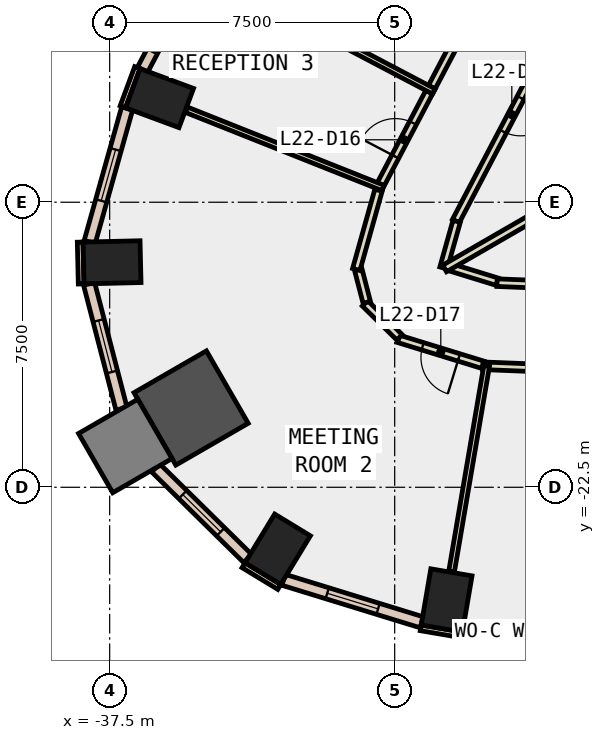
"""IFC4 building model, lengths in metres.
Left out: names, types, materials, properties, quantities, classifications, styles, units other than length and angle.
Written with IfcOpenShell. Run it as: python <this file> out.ifc"""

import sys

from ifc_helpers import new_model, si_unit, direction, frame, frame_2d, origin, origin_2d, place, context, subcontext, project, spatial, rectangle, extrude, element, fill, save


model = new_model("IFC4")
c1 = context("Model", 3, precision=1e-05, world=origin(), true_north=direction((0.0, 1.0)))
c2 = subcontext(c1, "Body", "Model", "MODEL_VIEW")
j1 = project(units=[si_unit("LENGTHUNIT", "METRE"), si_unit("PLANEANGLEUNIT", "RADIAN")], contexts=[c1])
p1 = place(None, origin())
s1 = spatial("IfcSite", under=j1, at=p1, CompositionType="ELEMENT")
p2 = place(p1, origin())
s2 = spatial("IfcBuilding", under=s1, at=p2, CompositionType="ELEMENT")
p3 = place(p2, frame((0.0, 0.0, 103.4)))
s3 = spatial("IfcBuildingStorey", under=s2, at=p3, CompositionType="ELEMENT", Elevation=103.4)
for number, where, z_axis, x_axis in (
    (1, (-28.633, -25.478, -0.4), (0.0, 0.0, 1.0), (-0.986, 0.168, 0.0)),
    (2, (-36.188, -12.261, -0.4), (0.0, 0.0, 1.0), (0.347, 0.938, 0.0)),
    (3, (-37.438, -16.581, -0.4), (0.0, 0.0, 1.0), (-0.023, 1.0, 0.0)),
):
    element("IfcColumn", number, at=place(p3, frame(where, z_axis=z_axis, x_axis=x_axis)), inside=s3, PredefinedType="COLUMN", context=c2, shape_type="SweptSolid", body=[
        extrude(rectangle(XDim=1.1, YDim=1.5, at=origin_2d()), origin(), (0.0, 0.0, 1.0), 4.2),
    ])
p4 = place(p3, frame((-35.357, -20.414, -0.4), z_axis=(0.0, 0.0, 1.0), x_axis=(0.866025403784, 0.5, 0.0)))
e4 = element("IfcColumn", 4, at=p4, inside=s3, PredefinedType="COLUMN", context=c2, shape_type="SweptSolid", body=[
    extrude(rectangle(XDim=2.2, YDim=2.2, at=origin_2d()), origin(), (0.0, 0.0, 1.0), 4.2),
])
p5 = place(p3, frame((-33.078, -24.132, -0.4), z_axis=(0.0, 0.0, 1.0), x_axis=(-0.854095929175, 0.520115510024, 0.0)))
e5 = element("IfcColumn", 5, at=p5, inside=s3, PredefinedType="COLUMN", context=c2, shape_type="SweptSolid", body=[
    extrude(rectangle(XDim=1.1, YDim=1.5, at=origin_2d()), origin(), (0.0, 0.0, 1.0), 4.2),
])
p6 = place(p3, frame((-37.089, -21.414, -0.4), z_axis=(0.0, 0.0, 1.0), x_axis=(0.866025403784, 0.5, 0.0)))
e6 = element("IfcColumn", 6, at=p6, inside=s3, PredefinedType="COLUMN", context=c2, shape_type="SweptSolid", body=[
    extrude(rectangle(XDim=1.8, YDim=1.8, at=origin_2d()), origin(), (0.0, 0.0, 1.0), 4.2),
])
p7 = place(p3, frame((-36.771, -11.458, 0.0), z_axis=(0.0, 0.0, 1.0), x_axis=(-0.347205967468, -0.937788897436, 0.0)))
e7 = element("IfcWall", 7, at=p7, inside=s3, PredefinedType="STANDARD", context=c2, shape_type="SweptSolid", body=[
    extrude(rectangle(XDim=1.1, YDim=0.15, at=frame_2d((0.55, 0.0))), origin(), (0.0, 0.0, 1.0), 3.8),
])
p8 = place(p3, frame((-29.314, -26.199, 0.0), z_axis=(0.0, 0.0, 1.0), x_axis=(0.985763338892, -0.168138751323, 0.0)))
e8 = element("IfcWall", 8, at=p8, inside=s3, PredefinedType="STANDARD", context=c2, shape_type="SweptSolid", body=[
    extrude(rectangle(XDim=1.101, YDim=0.15, at=frame_2d((0.55, 0.0))), origin(), (0.0, 0.0, 1.0), 3.8),
])
p9 = place(p3, frame((-38.276, -16.05, 0.0), z_axis=(0.0, 0.0, 1.0), x_axis=(0.023522901136, -0.999723298279, 0.0)))
e9 = element("IfcWall", 9, at=p9, inside=s3, PredefinedType="STANDARD", context=c2, shape_type="SweptSolid", body=[
    extrude(rectangle(XDim=1.1, YDim=0.15, at=frame_2d((0.55, 0.0))), origin(), (0.0, 0.0, 1.0), 3.8),
])
p10 = place(p3, frame((-33.977, -24.551, 0.0), z_axis=(0.0, 0.0, 1.0), x_axis=(0.854245682901, -0.519869515594, 0.0)))
e10 = element("IfcWall", 10, at=p10, inside=s3, PredefinedType="STANDARD", context=c2, shape_type="SweptSolid", body=[
    extrude(rectangle(XDim=1.1, YDim=0.15, at=frame_2d((0.55, 0.0))), origin(), (0.0, 0.0, 1.0), 3.8),
])
p11 = place(p3, frame((-28.205, -26.238, 0.0), z_axis=(0.0, 0.0, 1.0), x_axis=(0.99922113396, -0.039460428885, 0.0)))
e11 = element("IfcWall", 11, at=p11, inside=s3, PredefinedType="STANDARD", context=c2, shape_type="SweptSolid", body=[
    extrude(rectangle(XDim=5.878, YDim=0.3, at=frame_2d((2.939, 0.0))), origin(), (0.0, 0.0, 1.0), 3.8),
])
p12 = place(p11, frame((0.469, 0.0, 0.9)))
e12 = element("IfcOpeningElement", 12, at=p12, cuts=e11, PredefinedType="OPENING", context=c2, shape_type="SweptSolid", body=[
    extrude(rectangle(XDim=2.0, YDim=2.6, at=frame_2d((1.0, 1.3))), frame((0.0, 0.16, 0.0), z_axis=(0.0, -1.0, 0.0), x_axis=(1.0, 0.0, 0.0)), (0.0, 0.0, 1.0), 0.32),
])
p13 = place(p11, frame((3.408, 0.0, 0.9)))
e13 = element("IfcOpeningElement", 13, at=p13, cuts=e11, PredefinedType="OPENING", context=c2, shape_type="SweptSolid", body=[
    extrude(rectangle(XDim=2.0, YDim=2.6, at=frame_2d((1.0, 1.3))), frame((0.0, 0.16, 0.0), z_axis=(0.0, -1.0, 0.0), x_axis=(1.0, 0.0, 0.0)), (0.0, 0.0, 1.0), 0.32),
])
p14 = place(p3, frame((-33.776, -6.077, 0.0), z_axis=(0.0, 0.0, 1.0), x_axis=(-0.465380908665, -0.88511050714, 0.0)))
e14 = element("IfcWall", 14, at=p14, inside=s3, PredefinedType="STANDARD", context=c2, shape_type="SweptSolid", body=[
    extrude(rectangle(XDim=6.139, YDim=0.3, at=frame_2d((3.07, 0.0))), origin(), (0.0, 0.0, 1.0), 3.8),
])
p15 = place(p14, frame((0.535, 0.0, 0.9)))
e15 = element("IfcOpeningElement", 15, at=p15, cuts=e14, PredefinedType="OPENING", context=c2, shape_type="SweptSolid", body=[
    extrude(rectangle(XDim=2.0, YDim=2.6, at=frame_2d((1.0, 1.3))), frame((0.0, 0.16, 0.0), z_axis=(0.0, -1.0, 0.0), x_axis=(1.0, 0.0, 0.0)), (0.0, 0.0, 1.0), 0.32),
])
p16 = place(p14, frame((3.604, 0.0, 0.9)))
e16 = element("IfcOpeningElement", 16, at=p16, cuts=e14, PredefinedType="OPENING", context=c2, shape_type="SweptSolid", body=[
    extrude(rectangle(XDim=2.0, YDim=2.6, at=frame_2d((1.0, 1.3))), frame((0.0, 0.16, 0.0), z_axis=(0.0, -1.0, 0.0), x_axis=(1.0, 0.0, 0.0)), (0.0, 0.0, 1.0), 0.32),
])
p17 = place(p3, frame((-37.04, -12.531, 0.0), z_axis=(0.0, 0.0, 1.0), x_axis=(-0.270054089595, -0.96284515302, 0.0)))
e17 = element("IfcWall", 17, at=p17, inside=s3, PredefinedType="STANDARD", context=c2, shape_type="SweptSolid", body=[
    extrude(rectangle(XDim=3.651, YDim=0.3, at=frame_2d((1.825, 0.0))), origin(), (0.0, 0.0, 1.0), 3.8),
])
p18 = place(p17, frame((1.125, 0.0, 0.9)))
e18 = element("IfcOpeningElement", 18, at=p18, cuts=e17, PredefinedType="OPENING", context=c2, shape_type="SweptSolid", body=[
    extrude(rectangle(XDim=1.4, YDim=2.6, at=frame_2d((0.7, 1.3))), frame((0.0, 0.16, 0.0), z_axis=(0.0, -1.0, 0.0), x_axis=(1.0, 0.0, 0.0)), (0.0, 0.0, 1.0), 0.32),
])
p19 = place(p3, frame((-38.042, -17.144, 0.0), z_axis=(0.0, 0.0, 1.0), x_axis=(0.251046938153, -0.967974914367, 0.0)))
e19 = element("IfcWall", 19, at=p19, inside=s3, PredefinedType="STANDARD", context=c2, shape_type="SweptSolid", body=[
    extrude(rectangle(XDim=3.398, YDim=0.3, at=frame_2d((1.699, 0.0))), origin(), (0.0, 0.0, 1.0), 3.8),
])
p20 = place(p19, frame((0.999, 0.0, 0.9)))
e20 = element("IfcOpeningElement", 20, at=p20, cuts=e19, PredefinedType="OPENING", context=c2, shape_type="SweptSolid", body=[
    extrude(rectangle(XDim=1.4, YDim=2.6, at=frame_2d((0.7, 1.3))), frame((0.0, 0.16, 0.0), z_axis=(0.0, -1.0, 0.0), x_axis=(1.0, 0.0, 0.0)), (0.0, 0.0, 1.0), 0.32),
])
p21 = place(p3, frame((-36.289, -21.99, 0.0), z_axis=(0.0, 0.0, 1.0), x_axis=(0.712546371703, -0.701625019631, 0.0)))
e21 = element("IfcWall", 21, at=p21, inside=s3, PredefinedType="STANDARD", context=c2, shape_type="SweptSolid", body=[
    extrude(rectangle(XDim=3.398, YDim=0.3, at=frame_2d((1.699, 0.0))), origin(), (0.0, 0.0, 1.0), 3.8),
])
p22 = place(p21, frame((0.999, 0.0, 0.9)))
e22 = element("IfcOpeningElement", 22, at=p22, cuts=e21, PredefinedType="OPENING", context=c2, shape_type="SweptSolid", body=[
    extrude(rectangle(XDim=1.4, YDim=2.6, at=frame_2d((0.7, 1.3))), frame((0.0, 0.16, 0.0), z_axis=(0.0, -1.0, 0.0), x_axis=(1.0, 0.0, 0.0)), (0.0, 0.0, 1.0), 0.32),
])
p23 = place(p3, frame((-32.924, -24.935, 0.0), z_axis=(0.0, 0.0, 1.0), x_axis=(0.955841433148, -0.293882892794, 0.0)))
e23 = element("IfcWall", 23, at=p23, inside=s3, PredefinedType="STANDARD", context=c2, shape_type="SweptSolid", body=[
    extrude(rectangle(XDim=3.804, YDim=0.3, at=frame_2d((1.902, 0.0))), origin(), (0.0, 0.0, 1.0), 3.8),
])
p24 = place(p23, frame((1.202, 0.0, 0.9)))
e24 = element("IfcOpeningElement", 24, at=p24, cuts=e23, PredefinedType="OPENING", context=c2, shape_type="SweptSolid", body=[
    extrude(rectangle(XDim=1.4, YDim=2.6, at=frame_2d((0.7, 1.3))), frame((0.0, 0.16, 0.0), z_axis=(0.0, -1.0, 0.0), x_axis=(1.0, 0.0, 0.0)), (0.0, 0.0, 1.0), 0.32),
])
p25 = place(p3, frame((-25.446, -9.896, 0.0), z_axis=(0.0, 0.0, 1.0), x_axis=(-0.465367816287, -0.885117390838, 0.0)))
e25 = element("IfcWall", 25, at=p25, inside=s3, PredefinedType="PARTITIONING", context=c2, shape_type="SweptSolid", body=[
    extrude(rectangle(XDim=6.326, YDim=0.2, at=frame_2d((3.163, 0.0))), origin(), (0.0, 0.0, 1.0), 3.8),
])
p26 = place(p25, frame((2.663, 0.0, 0.0)))
e26 = element("IfcOpeningElement", 26, at=p26, cuts=e25, PredefinedType="OPENING", context=c2, shape_type="SweptSolid", body=[
    extrude(rectangle(XDim=1.0, YDim=2.1, at=frame_2d((0.5, 1.05))), frame((0.0, 0.11, 0.0), z_axis=(0.0, -1.0, 0.0), x_axis=(1.0, 0.0, 0.0)), (0.0, 0.0, 1.0), 0.22),
])
p27 = place(p3, frame((-28.37, -15.503, 0.0), z_axis=(0.0, 0.0, 1.0), x_axis=(-0.270645732093, -0.962679015924, 0.0)))
e27 = element("IfcWall", 27, at=p27, inside=s3, PredefinedType="PARTITIONING", context=c2, shape_type="SweptSolid", body=[
    extrude(rectangle(XDim=1.275, YDim=0.2, at=frame_2d((0.637, 0.0))), origin(), (0.0, 0.0, 1.0), 3.8),
])
p28 = place(p3, frame((-28.503, -16.722, 0.0), z_axis=(0.0, 0.0, 1.0), x_axis=(0.95579582576, -0.294031187904, 0.0)))
e28 = element("IfcWall", 28, at=p28, inside=s3, PredefinedType="PARTITIONING", context=c2, shape_type="SweptSolid", body=[
    extrude(rectangle(XDim=1.255, YDim=0.2, at=frame_2d((0.628, 0.0))), origin(), (0.0, 0.0, 1.0), 3.8),
])
p29 = place(p3, frame((-27.307, -17.116, 0.0), z_axis=(0.0, 0.0, 1.0), x_axis=(0.999217829656, -0.039544012168, 0.0)))
e29 = element("IfcWall", 29, at=p29, inside=s3, PredefinedType="PARTITIONING", context=c2, shape_type="SweptSolid", body=[
    extrude(rectangle(XDim=5.841, YDim=0.2, at=frame_2d((2.92, 0.0))), origin(), (0.0, 0.0, 1.0), 3.8),
])
p30 = place(p29, frame((2.42, 0.0, 0.0)))
e30 = element("IfcOpeningElement", 30, at=p30, cuts=e29, PredefinedType="OPENING", context=c2, shape_type="SweptSolid", body=[
    extrude(rectangle(XDim=1.0, YDim=2.1, at=frame_2d((0.5, 1.05))), frame((0.0, 0.11, 0.0), z_axis=(0.0, -1.0, 0.0), x_axis=(1.0, 0.0, 0.0)), (0.0, 0.0, 1.0), 0.22),
])
p31 = place(p3, frame((-29.023, -11.972, 0.0), z_axis=(0.0, 0.0, 1.0), x_axis=(0.465457263931, 0.885070356217, 0.0)))
e31 = element("IfcWall", 31, at=p31, inside=s3, PredefinedType="PARTITIONING", context=c2, shape_type="SweptSolid", body=[
    extrude(rectangle(XDim=3.515, YDim=0.2, at=frame_2d((1.757, 0.0))), origin(), (0.0, 0.0, 1.0), 3.8),
])
p32 = place(p31, frame((1.257, 0.0, 0.0)))
e32 = element("IfcOpeningElement", 32, at=p32, cuts=e31, PredefinedType="OPENING", context=c2, shape_type="SweptSolid", body=[
    extrude(rectangle(XDim=1.0, YDim=2.1, at=frame_2d((0.5, 1.05))), frame((0.0, 0.11, 0.0), z_axis=(0.0, -1.0, 0.0), x_axis=(1.0, 0.0, 0.0)), (0.0, 0.0, 1.0), 0.22),
])
p33 = place(p3, frame((-30.41, -14.61, 0.0), z_axis=(0.0, 0.0, 1.0), x_axis=(0.46516343569, 0.885224817827, 0.0)))
e33 = element("IfcWall", 33, at=p33, inside=s3, PredefinedType="PARTITIONING", context=c2, shape_type="SweptSolid", body=[
    extrude(rectangle(XDim=2.831, YDim=0.2, at=frame_2d((1.416, 0.0))), origin(), (0.0, 0.0, 1.0), 3.8),
])
p34 = place(p33, frame((0.916, 0.0, 0.0)))
e34 = element("IfcOpeningElement", 34, at=p34, cuts=e33, PredefinedType="OPENING", context=c2, shape_type="SweptSolid", body=[
    extrude(rectangle(XDim=1.0, YDim=2.1, at=frame_2d((0.5, 1.05))), frame((0.0, 0.11, 0.0), z_axis=(0.0, -1.0, 0.0), x_axis=(1.0, 0.0, 0.0)), (0.0, 0.0, 1.0), 0.22),
])
p35 = place(p3, frame((-27.676, -19.278, 0.0), z_axis=(0.0, 0.0, 1.0), x_axis=(-0.95581080774, 0.293982482143, 0.0)))
e35 = element("IfcWall", 35, at=p35, inside=s3, PredefinedType="PARTITIONING", context=c2, shape_type="SweptSolid", body=[
    extrude(rectangle(XDim=2.324, YDim=0.2, at=frame_2d((1.162, 0.0))), origin(), (0.0, 0.0, 1.0), 3.8),
])
p36 = place(p35, frame((0.662, 0.0, 0.0)))
e36 = element("IfcOpeningElement", 36, at=p36, cuts=e35, PredefinedType="OPENING", context=c2, shape_type="SweptSolid", body=[
    extrude(rectangle(XDim=1.0, YDim=2.1, at=frame_2d((0.5, 1.05))), frame((0.0, 0.11, 0.0), z_axis=(0.0, -1.0, 0.0), x_axis=(1.0, 0.0, 0.0)), (0.0, 0.0, 1.0), 0.22),
])
p37 = place(p3, frame((-29.873, -18.554, 0.0), z_axis=(0.0, 0.0, 1.0), x_axis=(-0.712546188185, 0.701625206006, 0.0)))
e37 = element("IfcWall", 37, at=p37, inside=s3, PredefinedType="PARTITIONING", context=c2, shape_type="SweptSolid", body=[
    extrude(rectangle(XDim=1.274, YDim=0.2, at=frame_2d((0.637, 0.0))), origin(), (0.0, 0.0, 1.0), 3.8),
])
p38 = place(p3, frame((-30.735, -17.634, 0.0), z_axis=(0.0, 0.0, 1.0), x_axis=(-0.251095196118, 0.967962397248, 0.0)))
e38 = element("IfcWall", 38, at=p38, inside=s3, PredefinedType="PARTITIONING", context=c2, shape_type="SweptSolid", body=[
    extrude(rectangle(XDim=0.892, YDim=0.2, at=frame_2d((0.446, 0.0))), origin(), (0.0, 0.0, 1.0), 3.8),
])
p39 = place(p3, frame((-31.011, -16.77, 0.0), z_axis=(0.0, 0.0, 1.0), x_axis=(0.270131711391, 0.962823378664, 0.0)))
e39 = element("IfcWall", 39, at=p39, inside=s3, PredefinedType="PARTITIONING", context=c2, shape_type="SweptSolid", body=[
    extrude(rectangle(XDim=2.166, YDim=0.2, at=frame_2d((1.083, 0.0))), origin(), (0.0, 0.0, 1.0), 3.8),
])
p40 = place(p3, frame((-21.547, -19.546, 0.0), z_axis=(0.0, 0.0, 1.0), x_axis=(-0.999216450883, 0.039578836331, 0.0)))
e40 = element("IfcWall", 40, at=p40, inside=s3, PredefinedType="PARTITIONING", context=c2, shape_type="SweptSolid", body=[
    extrude(rectangle(XDim=6.138, YDim=0.2, at=frame_2d((3.069, 0.0))), origin(), (0.0, 0.0, 1.0), 3.8),
])
p41 = place(p40, frame((2.569, 0.0, 0.0)))
e41 = element("IfcOpeningElement", 41, at=p41, cuts=e40, PredefinedType="OPENING", context=c2, shape_type="SweptSolid", body=[
    extrude(rectangle(XDim=1.0, YDim=2.1, at=frame_2d((0.5, 1.05))), frame((0.0, 0.11, 0.0), z_axis=(0.0, -1.0, 0.0), x_axis=(1.0, 0.0, 0.0)), (0.0, 0.0, 1.0), 0.22),
])
p42 = place(p3, frame((-19.277, -11.311, 0.0), z_axis=(0.0, 0.0, 1.0), x_axis=(-0.866078939042, -0.499907262747, 0.0)))
e42 = element("IfcWall", 42, at=p42, inside=s3, PredefinedType="PARTITIONING", context=c2, shape_type="SweptSolid", body=[
    extrude(rectangle(XDim=10.864, YDim=0.2, at=frame_2d((5.432, 0.0))), origin(), (0.0, 0.0, 1.0), 3.8),
])
p43 = place(p3, frame((-28.969, -12.084, 0.0), z_axis=(0.0, 0.0, 1.0), x_axis=(-0.885142220222, 0.465320588391, 0.0)))
e43 = element("IfcWall", 43, at=p43, inside=s3, PredefinedType="PARTITIONING", context=c2, shape_type="SweptSolid", body=[
    extrude(rectangle(XDim=6.9, YDim=0.15, at=frame_2d((3.45, 0.0))), origin(), (0.0, 0.0, 1.0), 3.8),
])
p44 = place(p3, frame((-30.306, -14.625, 0.0), z_axis=(0.0, 0.0, 1.0), x_axis=(-0.929128339298, 0.369757392235, 0.0)))
e44 = element("IfcWall", 44, at=p44, inside=s3, PredefinedType="PARTITIONING", context=c2, shape_type="SweptSolid", body=[
    extrude(rectangle(XDim=5.569, YDim=0.15, at=frame_2d((2.784, 0.0))), origin(), (0.0, 0.0, 1.0), 3.8),
])
p45 = place(p3, frame((-27.58, -19.307, 0.0), z_axis=(0.0, 0.0, 1.0), x_axis=(-0.168089900424, -0.98577167, 0.0)))
e45 = element("IfcWall", 45, at=p45, inside=s3, PredefinedType="PARTITIONING", context=c2, shape_type="SweptSolid", body=[
    extrude(rectangle(XDim=5.49, YDim=0.15, at=frame_2d((2.745, 0.0))), origin(), (0.0, 0.0, 1.0), 3.8),
])
p46 = place(p12, origin())
e46 = element("IfcWindow", 46, at=p46, inside=s3, PartitioningType="SINGLE_PANEL", PredefinedType="WINDOW", context=c2, shape_type="SweptSolid", body=[
    extrude(rectangle(XDim=2.0, YDim=2.6, at=frame_2d((1.0, 1.3))), frame((0.0, 0.03, 0.0), z_axis=(0.0, -1.0, 0.0), x_axis=(1.0, 0.0, 0.0)), (0.0, 0.0, 1.0), 0.06),
])
fill(e12, e46)
p47 = place(p18, origin())
e47 = element("IfcWindow", 47, at=p47, inside=s3, PartitioningType="SINGLE_PANEL", PredefinedType="WINDOW", context=c2, shape_type="SweptSolid", body=[
    extrude(rectangle(XDim=1.4, YDim=2.6, at=frame_2d((0.7, 1.3))), frame((0.0, 0.03, 0.0), z_axis=(0.0, -1.0, 0.0), x_axis=(1.0, 0.0, 0.0)), (0.0, 0.0, 1.0), 0.06),
])
fill(e18, e47)
p48 = place(p20, origin())
e48 = element("IfcWindow", 48, at=p48, inside=s3, PartitioningType="SINGLE_PANEL", PredefinedType="WINDOW", context=c2, shape_type="SweptSolid", body=[
    extrude(rectangle(XDim=1.4, YDim=2.6, at=frame_2d((0.7, 1.3))), frame((0.0, 0.03, 0.0), z_axis=(0.0, -1.0, 0.0), x_axis=(1.0, 0.0, 0.0)), (0.0, 0.0, 1.0), 0.06),
])
fill(e20, e48)
p49 = place(p22, origin())
e49 = element("IfcWindow", 49, at=p49, inside=s3, PartitioningType="SINGLE_PANEL", PredefinedType="WINDOW", context=c2, shape_type="SweptSolid", body=[
    extrude(rectangle(XDim=1.4, YDim=2.6, at=frame_2d((0.7, 1.3))), frame((0.0, 0.03, 0.0), z_axis=(0.0, -1.0, 0.0), x_axis=(1.0, 0.0, 0.0)), (0.0, 0.0, 1.0), 0.06),
])
fill(e22, e49)
p50 = place(p24, origin())
e50 = element("IfcWindow", 50, at=p50, inside=s3, PartitioningType="SINGLE_PANEL", PredefinedType="WINDOW", context=c2, shape_type="SweptSolid", body=[
    extrude(rectangle(XDim=1.4, YDim=2.6, at=frame_2d((0.7, 1.3))), frame((0.0, 0.03, 0.0), z_axis=(0.0, -1.0, 0.0), x_axis=(1.0, 0.0, 0.0)), (0.0, 0.0, 1.0), 0.06),
])
fill(e24, e50)
p51 = place(p34, origin())
e51 = element("IfcDoor", 51, at=p51, inside=s3, OperationType="SINGLE_SWING_LEFT", PredefinedType="DOOR", context=c2, shape_type="SweptSolid", body=[
    extrude(rectangle(XDim=1.0, YDim=2.1, at=frame_2d((0.5, 1.05))), frame((0.0, 0.025, 0.0), z_axis=(0.0, -1.0, 0.0), x_axis=(1.0, 0.0, 0.0)), (0.0, 0.0, 1.0), 0.05),
])
fill(e34, e51)
p52 = place(p36, origin())
e52 = element("IfcDoor", 52, at=p52, inside=s3, OperationType="SINGLE_SWING_LEFT", PredefinedType="DOOR", context=c2, shape_type="SweptSolid", body=[
    extrude(rectangle(XDim=1.0, YDim=2.1, at=frame_2d((0.5, 1.05))), frame((0.0, 0.025, 0.0), z_axis=(0.0, -1.0, 0.0), x_axis=(1.0, 0.0, 0.0)), (0.0, 0.0, 1.0), 0.05),
])
fill(e36, e52)
p53 = place(p26, origin())
e53 = element("IfcDoor", 53, at=p53, inside=s3, OperationType="SINGLE_SWING_LEFT", PredefinedType="DOOR", context=c2, shape_type="SweptSolid", body=[
    extrude(rectangle(XDim=1.0, YDim=2.1, at=frame_2d((0.5, 1.05))), frame((0.0, 0.025, 0.0), z_axis=(0.0, -1.0, 0.0), x_axis=(1.0, 0.0, 0.0)), (0.0, 0.0, 1.0), 0.05),
])
fill(e26, e53)
save(model, sys.argv[1])
